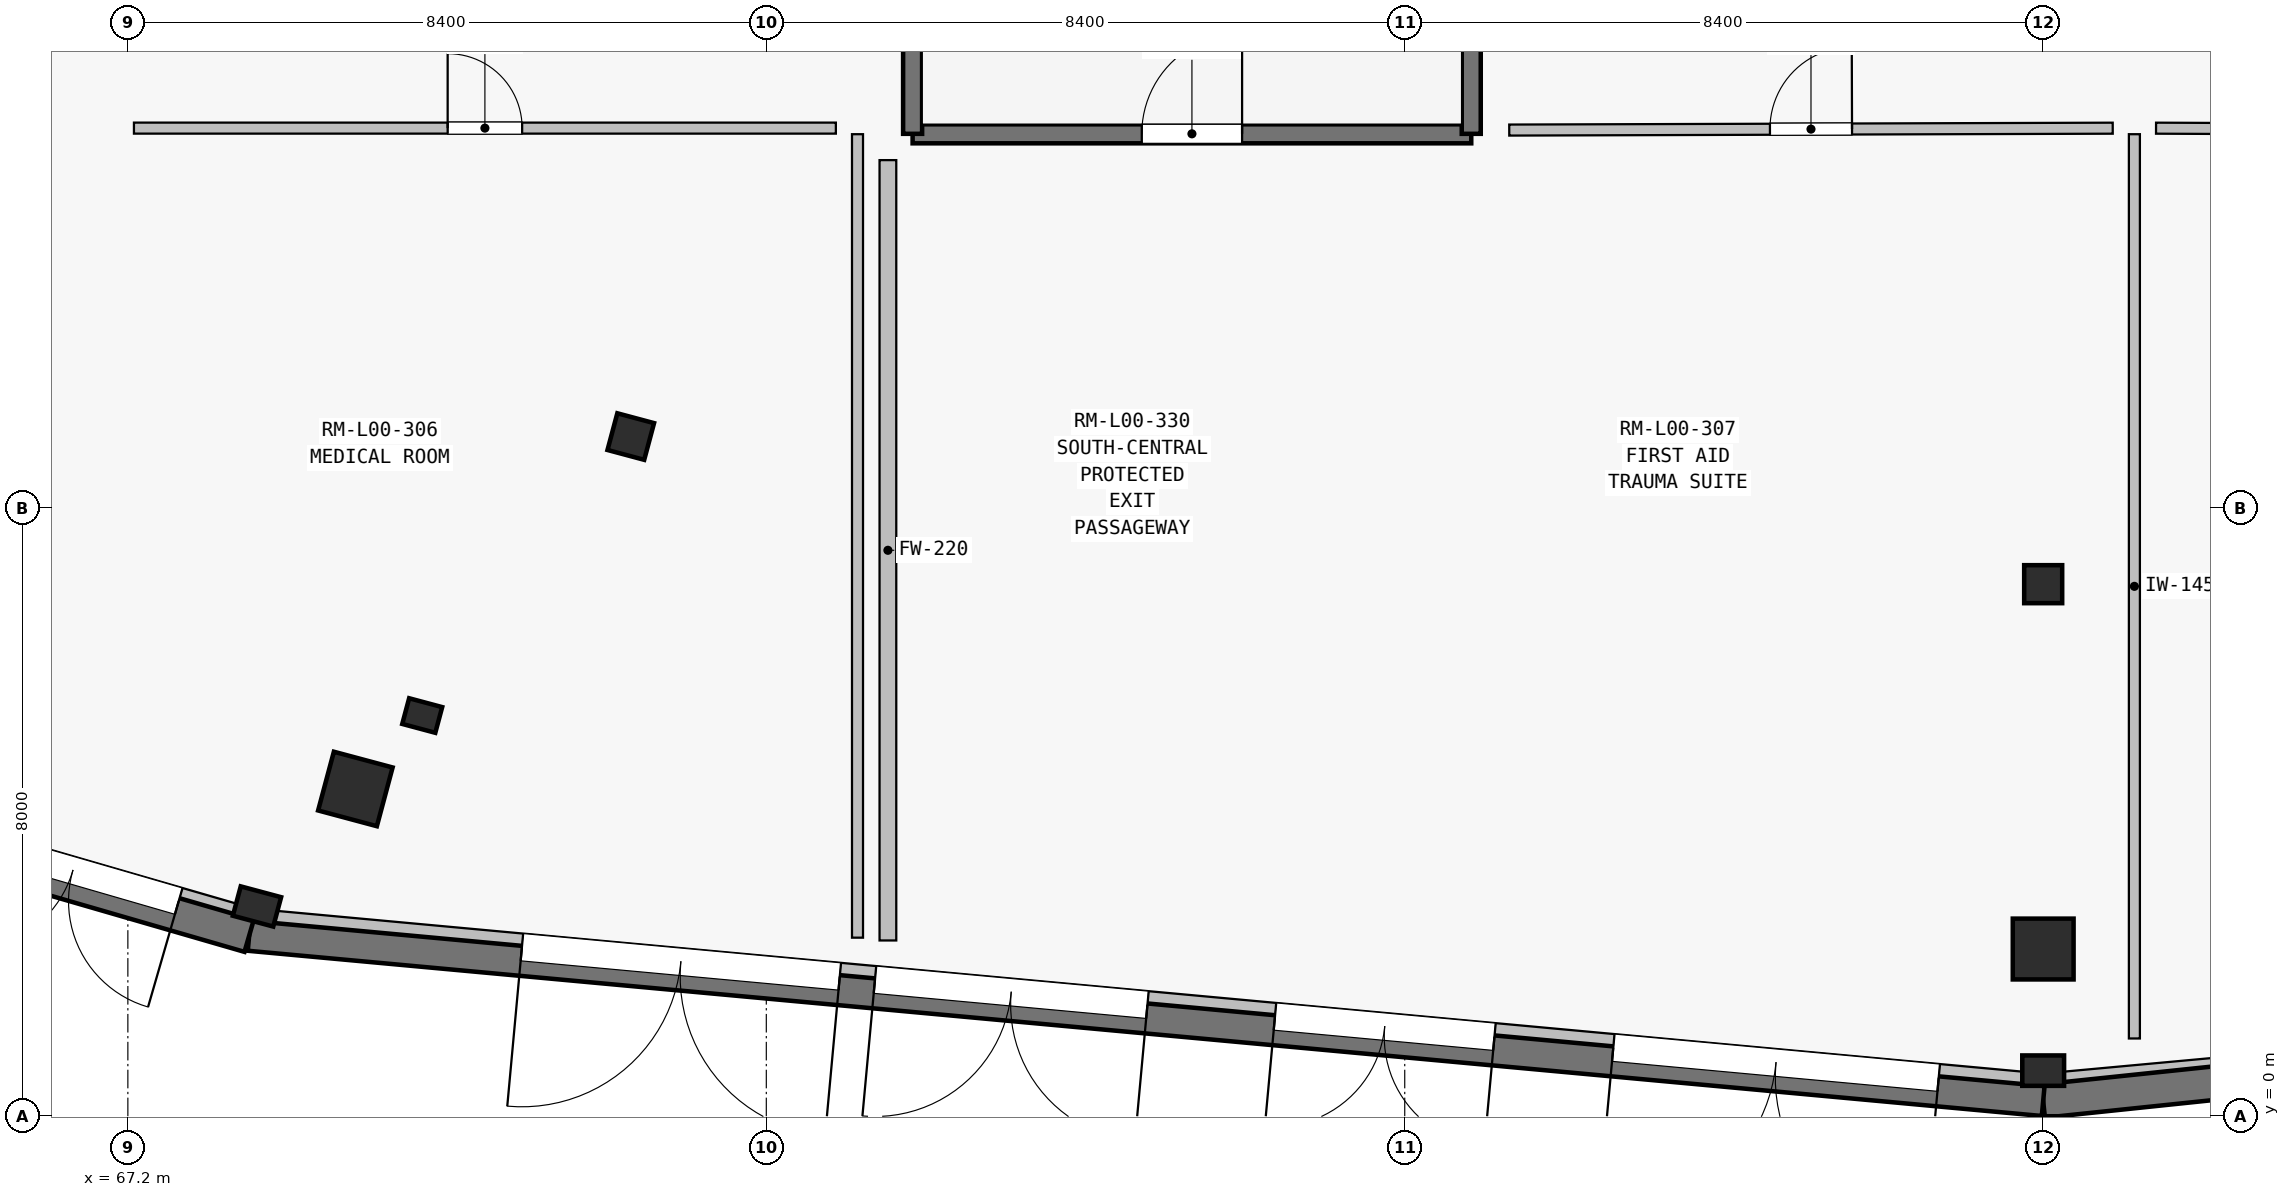
"""IFC4 building model, lengths in metres.
Left out: names, types, materials, properties, quantities, classifications, styles, units other than length and angle.
Written with IfcOpenShell. Run it as: python <this file> out.ifc"""

import sys

from ifc_helpers import new_model, si_unit, direction, frame, frame_2d, origin, origin_2d, place, context, subcontext, project, spatial, rectangle, i_section, extrude, element, fill, save


model = new_model("IFC4")
c1 = context("Model", 3, precision=1e-05, world=origin(), true_north=direction((0.0, 1.0)))
c2 = subcontext(c1, "Body", "Model", "MODEL_VIEW")
j1 = project(units=[si_unit("LENGTHUNIT", "METRE"), si_unit("PLANEANGLEUNIT", "RADIAN")], contexts=[c1])
p1 = place(None, origin())
s1 = spatial("IfcSite", under=j1, at=p1, CompositionType="ELEMENT")
p2 = place(p1, origin())
s2 = spatial("IfcBuilding", under=s1, at=p2, CompositionType="ELEMENT")
p3 = place(p2, origin())
s3 = spatial("IfcBuildingStorey", under=s2, at=p3, CompositionType="ELEMENT", Elevation=0.0)
for number, where, z_axis, x_axis in (
    (1, (73.817, 8.942, 0.0), (0.0, 0.0, 1.0), (-0.259, -0.966, 0.0)),
    (2, (92.4, 7.0, 0.0), (0.0, 0.0, 1.0), (0.0, -1.0, 0.0)),
):
    element("IfcColumn", number, at=place(p3, frame(where, z_axis=z_axis, x_axis=x_axis)), inside=s3, PredefinedType="COLUMN", context=c2, shape_type="SweptSolid", body=[
        extrude(i_section(OverallWidth=0.5, OverallDepth=0.5, WebThickness=0.02, FlangeThickness=0.035, at=origin_2d()), origin(), (0.0, 0.0, 1.0), 5.4),
    ])
for number, where, z_axis, x_axis in (
    (3, (70.193, 4.306, 0.0), (0.0, 0.0, 1.0), (-0.259, -0.966, 0.0)),
    (4, (92.4, 2.2, 0.0), (0.0, 0.0, 1.0), (0.0, -1.0, 0.0)),
):
    element("IfcColumn", number, at=place(p3, frame(where, z_axis=z_axis, x_axis=x_axis)), inside=s3, PredefinedType="COLUMN", context=c2, shape_type="SweptSolid", body=[
        extrude(rectangle(XDim=0.8, YDim=0.8, at=origin_2d()), origin(), (0.0, 0.0, 1.0), 5.4),
    ])
for number, where, z_axis, x_axis in (
    (5, (68.899, 2.76, 0.0), (0.0, 0.0, 1.0), (-0.259, -0.966, 0.0)),
    (6, (92.4, 0.6, 0.0), (0.0, 0.0, 1.0), (0.0, -1.0, 0.0)),
):
    element("IfcColumn", number, at=place(p3, frame(where, z_axis=z_axis, x_axis=x_axis)), inside=s3, PredefinedType="PILASTER", context=c2, shape_type="SweptSolid", body=[
        extrude(rectangle(XDim=0.4, YDim=0.55, at=origin_2d()), origin(), (0.0, 0.0, 1.0), 6.35),
    ])
p4 = place(p3, frame((71.073, 5.272, 0.0), z_axis=(0.0, 0.0, 1.0), x_axis=(-0.258819045103, -0.965925826289, 0.0)))
e7 = element("IfcColumn", 7, at=p4, inside=s3, PredefinedType="PILASTER", context=c2, shape_type="SweptSolid", body=[
    extrude(rectangle(XDim=0.35, YDim=0.45, at=origin_2d()), origin(), (0.0, 0.0, 1.0), 5.4),
])
p5 = place(p3, frame((116.031, 2.557, 0.0), z_axis=(0.0, 0.0, 1.0), x_axis=(-0.995785515714, -0.09171263105, 0.0)))
e8 = element("IfcWall", 8, at=p5, inside=s3, PredefinedType="SOLIDWALL", context=c2, shape_type="SweptSolid", body=[
    extrude(rectangle(XDim=23.791, YDim=0.36, at=frame_2d((11.895, 0.0))), origin(), (0.0, 0.0, 1.0), 5.15),
])
p6 = place(p5, frame((8.31, 0.0, 0.0)))
e9 = element("IfcOpeningElement", 9, at=p6, cuts=e8, PredefinedType="OPENING", context=c2, shape_type="SweptSolid", body=[
    extrude(rectangle(XDim=2.9, YDim=2.55, at=frame_2d((1.45, 1.275))), frame((0.0, 0.19, 0.0), z_axis=(0.0, -1.0, 0.0), x_axis=(1.0, 0.0, 0.0)), (0.0, 0.0, 1.0), 0.38),
])
p7 = place(p5, frame((11.895, 0.0, 0.0)))
e10 = element("IfcOpeningElement", 10, at=p7, cuts=e8, PredefinedType="OPENING", context=c2, shape_type="SweptSolid", body=[
    extrude(rectangle(XDim=3.6, YDim=2.6, at=frame_2d((1.8, 1.3))), frame((0.0, 0.19, 0.0), z_axis=(0.0, -1.0, 0.0), x_axis=(1.0, 0.0, 0.0)), (0.0, 0.0, 1.0), 0.38),
])
p8 = place(p5, frame((2.54, 0.0, 0.0)))
e11 = element("IfcOpeningElement", 11, at=p8, cuts=e8, PredefinedType="OPENING", context=c2, shape_type="SweptSolid", body=[
    extrude(rectangle(XDim=4.3, YDim=2.75, at=frame_2d((2.15, 1.375))), frame((0.0, 0.19, 0.0), z_axis=(0.0, -1.0, 0.0), x_axis=(1.0, 0.0, 0.0)), (0.0, 0.0, 1.0), 0.38),
])
p9 = place(p5, frame((15.96, 0.0, 0.0)))
e12 = element("IfcOpeningElement", 12, at=p9, cuts=e8, PredefinedType="OPENING", context=c2, shape_type="SweptSolid", body=[
    extrude(rectangle(XDim=4.2, YDim=2.7, at=frame_2d((2.1, 1.35))), frame((0.0, 0.19, 0.0), z_axis=(0.0, -1.0, 0.0), x_axis=(1.0, 0.0, 0.0)), (0.0, 0.0, 1.0), 0.38),
])
p10 = place(p3, frame((92.459, 0.375, 0.0), z_axis=(0.0, 0.0, 1.0), x_axis=(-0.995785515714, 0.09171263105, 0.0)))
e13 = element("IfcWall", 13, at=p10, inside=s3, PredefinedType="SOLIDWALL", context=c2, shape_type="SweptSolid", body=[
    extrude(rectangle(XDim=23.791, YDim=0.36, at=frame_2d((11.895, 0.0))), origin(), (0.0, 0.0, 1.0), 5.15),
])
p11 = place(p10, frame((7.31, 0.0, 0.0)))
e14 = element("IfcOpeningElement", 14, at=p11, cuts=e13, PredefinedType="OPENING", context=c2, shape_type="SweptSolid", body=[
    extrude(rectangle(XDim=2.9, YDim=2.55, at=frame_2d((1.45, 1.275))), frame((0.0, 0.19, 0.0), z_axis=(0.0, -1.0, 0.0), x_axis=(1.0, 0.0, 0.0)), (0.0, 0.0, 1.0), 0.38),
])
p12 = place(p10, frame((11.895, 0.0, 0.0)))
e15 = element("IfcOpeningElement", 15, at=p12, cuts=e13, PredefinedType="OPENING", context=c2, shape_type="SweptSolid", body=[
    extrude(rectangle(XDim=3.6, YDim=2.6, at=frame_2d((1.8, 1.3))), frame((0.0, 0.19, 0.0), z_axis=(0.0, -1.0, 0.0), x_axis=(1.0, 0.0, 0.0)), (0.0, 0.0, 1.0), 0.38),
])
p13 = place(p10, frame((1.44, 0.0, 0.0)))
e16 = element("IfcOpeningElement", 16, at=p13, cuts=e13, PredefinedType="OPENING", context=c2, shape_type="SweptSolid", body=[
    extrude(rectangle(XDim=4.3, YDim=2.75, at=frame_2d((2.15, 1.375))), frame((0.0, 0.19, 0.0), z_axis=(0.0, -1.0, 0.0), x_axis=(1.0, 0.0, 0.0)), (0.0, 0.0, 1.0), 0.38),
])
p14 = place(p10, frame((15.96, 0.0, 0.0)))
e17 = element("IfcOpeningElement", 17, at=p14, cuts=e13, PredefinedType="OPENING", context=c2, shape_type="SweptSolid", body=[
    extrude(rectangle(XDim=4.2, YDim=2.7, at=frame_2d((2.1, 1.35))), frame((0.0, 0.19, 0.0), z_axis=(0.0, -1.0, 0.0), x_axis=(1.0, 0.0, 0.0)), (0.0, 0.0, 1.0), 0.38),
])
p15 = place(p3, frame((68.887, 2.535, 0.0), z_axis=(0.0, 0.0, 1.0), x_axis=(-0.960488382724, 0.278320079498, 0.0)))
e18 = element("IfcWall", 18, at=p15, inside=s3, PredefinedType="SOLIDWALL", context=c2, shape_type="SweptSolid", body=[
    extrude(rectangle(XDim=22.987, YDim=0.36, at=frame_2d((11.493, 0.0))), origin(), (0.0, 0.0, 1.0), 5.15),
])
p16 = place(p15, frame((1.06, 0.0, 0.0)))
e19 = element("IfcOpeningElement", 19, at=p16, cuts=e18, PredefinedType="OPENING", context=c2, shape_type="SweptSolid", body=[
    extrude(rectangle(XDim=2.9, YDim=2.55, at=frame_2d((1.45, 1.275))), frame((0.0, 0.19, 0.0), z_axis=(0.0, -1.0, 0.0), x_axis=(1.0, 0.0, 0.0)), (0.0, 0.0, 1.0), 0.38),
])
p17 = place(p15, frame((9.693, 0.0, 0.0)))
e20 = element("IfcOpeningElement", 20, at=p17, cuts=e18, PredefinedType="OPENING", context=c2, shape_type="SweptSolid", body=[
    extrude(rectangle(XDim=3.6, YDim=2.6, at=frame_2d((1.8, 1.3))), frame((0.0, 0.19, 0.0), z_axis=(0.0, -1.0, 0.0), x_axis=(1.0, 0.0, 0.0)), (0.0, 0.0, 1.0), 0.38),
])
p18 = place(p15, frame((4.3, 0.0, 0.0)))
e21 = element("IfcOpeningElement", 21, at=p18, cuts=e18, PredefinedType="OPENING", context=c2, shape_type="SweptSolid", body=[
    extrude(rectangle(XDim=4.3, YDim=2.75, at=frame_2d((2.15, 1.375))), frame((0.0, 0.19, 0.0), z_axis=(0.0, -1.0, 0.0), x_axis=(1.0, 0.0, 0.0)), (0.0, 0.0, 1.0), 0.38),
])
p19 = place(p15, frame((13.76, 0.0, 0.0)))
e22 = element("IfcOpeningElement", 22, at=p19, cuts=e18, PredefinedType="OPENING", context=c2, shape_type="SweptSolid", body=[
    extrude(rectangle(XDim=4.2, YDim=2.7, at=frame_2d((2.1, 1.35))), frame((0.0, 0.19, 0.0), z_axis=(0.0, -1.0, 0.0), x_axis=(1.0, 0.0, 0.0)), (0.0, 0.0, 1.0), 0.38),
])
p20 = place(p15, frame((18.38, 0.0, 0.0)))
e23 = element("IfcOpeningElement", 23, at=p20, cuts=e18, PredefinedType="OPENING", context=c2, shape_type="SweptSolid", body=[
    extrude(rectangle(XDim=2.9, YDim=2.55, at=frame_2d((1.45, 1.275))), frame((0.0, 0.19, 0.0), z_axis=(0.0, -1.0, 0.0), x_axis=(1.0, 0.0, 0.0)), (0.0, 0.0, 1.0), 0.38),
])
p21 = place(p3, frame((117.6, 2.836, -4.5), z_axis=(0.0, 0.0, 1.0), x_axis=(-0.994572720995, -0.104043753549, 0.0)))
e24 = element("IfcWall", 24, at=p21, inside=s3, PredefinedType="USERDEFINED", context=c2, shape_type="SweptSolid", body=[
    extrude(rectangle(XDim=25.338, YDim=0.44, at=frame_2d((12.669, 0.0))), origin(), (0.0, 0.0, 1.0), 4.5),
])
p22 = place(p3, frame((92.4, 0.2, -4.5), z_axis=(0.0, 0.0, 1.0), x_axis=(-0.995786061743, 0.091706702251, 0.0)))
e25 = element("IfcWall", 25, at=p22, inside=s3, PredefinedType="USERDEFINED", context=c2, shape_type="SweptSolid", body=[
    extrude(rectangle(XDim=23.704, YDim=0.395, at=frame_2d((11.852, 0.0))), origin(), (0.0, 0.0, 1.0), 4.5),
])
p23 = place(p3, frame((68.796, 2.374, -4.5), z_axis=(0.0, 0.0, 1.0), x_axis=(-0.960486896269, 0.278325209236, 0.0)))
e26 = element("IfcWall", 26, at=p23, inside=s3, PredefinedType="USERDEFINED", context=c2, shape_type="SweptSolid", body=[
    extrude(rectangle(XDim=22.9, YDim=0.44, at=frame_2d((11.45, 0.0))), origin(), (0.0, 0.0, 1.0), 4.5),
])
p24 = place(p3, frame((77.525, 12.925, 0.0), z_axis=(0.0, 0.0, 1.0), x_axis=(1.0, 0.0, 0.0)))
e27 = element("IfcWall", 27, at=p24, inside=s3, PredefinedType="SHEAR", context=c2, shape_type="SweptSolid", body=[
    extrude(rectangle(XDim=7.35, YDim=0.25, at=frame_2d((3.675, 0.0))), origin(), (0.0, 0.0, 1.0), 5.4),
])
p25 = place(p24, frame((3.015, 0.0, 0.0)))
e28 = element("IfcOpeningElement", 28, at=p25, cuts=e27, PredefinedType="OPENING", context=c2, shape_type="SweptSolid", body=[
    extrude(rectangle(XDim=1.32, YDim=2.2, at=frame_2d((0.66, 1.1))), frame((0.0, 0.135, 0.0), z_axis=(0.0, -1.0, 0.0), x_axis=(1.0, 0.0, 0.0)), (0.0, 0.0, 1.0), 0.27),
])
for number, where, z_axis, x_axis in (
    (29, (77.525, 12.925, 0.0), (0.0, 0.0, 1.0), (0.0, 1.0, 0.0)),
    (30, (84.875, 12.925, 0.0), (0.0, 0.0, 1.0), (0.0, 1.0, 0.0)),
):
    element("IfcWall", number, at=place(p3, frame(where, z_axis=z_axis, x_axis=x_axis)), inside=s3, PredefinedType="SHEAR", context=c2, shape_type="SweptSolid", body=[
        extrude(rectangle(XDim=12.75, YDim=0.25, at=frame_2d((6.375, 0.0))), origin(), (0.0, 0.0, 1.0), 5.4),
    ])
p26 = place(p3, frame((76.8, 12.92, 0.0), z_axis=(0.0, 0.0, 1.0), x_axis=(0.0, -1.0, 0.0)))
e31 = element("IfcWall", 31, at=p26, inside=s3, PredefinedType="PARTITIONING", context=c2, shape_type="SweptSolid", body=[
    extrude(rectangle(XDim=10.571, YDim=0.145, at=frame_2d((5.285, 0.0))), origin(), (0.0, 0.0, 1.0), 4.295),
])
p27 = place(p3, frame((67.28, 13.0, 0.0), z_axis=(0.0, 0.0, 1.0), x_axis=(1.0, 0.0, 0.0)))
e32 = element("IfcWall", 32, at=p27, inside=s3, PredefinedType="PARTITIONING", context=c2, shape_type="SweptSolid", body=[
    extrude(rectangle(XDim=9.235, YDim=0.145, at=frame_2d((4.618, 0.0))), origin(), (0.0, 0.0, 1.0), 4.503),
])
p28 = place(p27, frame((4.128, 0.0, 0.0)))
e33 = element("IfcOpeningElement", 33, at=p28, cuts=e32, PredefinedType="OPENING", context=c2, shape_type="SweptSolid", body=[
    extrude(rectangle(XDim=0.98, YDim=2.15, at=frame_2d((0.49, 1.075))), frame((0.0, 0.083, 0.0), z_axis=(0.0, -1.0, 0.0), x_axis=(1.0, 0.0, 0.0)), (0.0, 0.0, 1.0), 0.165),
])
p29 = place(p3, frame((93.6, 12.92, 0.0), z_axis=(0.0, 0.0, 1.0), x_axis=(0.0, -1.0, 0.0)))
e34 = element("IfcWall", 34, at=p29, inside=s3, PredefinedType="PARTITIONING", context=c2, shape_type="SweptSolid", body=[
    extrude(rectangle(XDim=11.897, YDim=0.145, at=frame_2d((5.948, 0.0))), origin(), (0.0, 0.0, 1.0), 4.295),
])
p30 = place(p3, frame((85.375, 12.974, 0.0), z_axis=(0.0, 0.0, 1.0), x_axis=(0.99999517769, 0.003105575086, 0.0)))
e35 = element("IfcWall", 35, at=p30, inside=s3, PredefinedType="PARTITIONING", context=c2, shape_type="SweptSolid", body=[
    extrude(rectangle(XDim=7.94, YDim=0.145, at=frame_2d((3.97, 0.0))), origin(), (0.0, 0.0, 1.0), 4.483),
])
p31 = place(p30, frame((3.43, 0.0, 0.0)))
e36 = element("IfcOpeningElement", 36, at=p31, cuts=e35, PredefinedType="OPENING", context=c2, shape_type="SweptSolid", body=[
    extrude(rectangle(XDim=1.08, YDim=2.15, at=frame_2d((0.54, 1.075))), frame((0.0, 0.083, 0.0), z_axis=(0.0, -1.0, 0.0), x_axis=(1.0, 0.0, 0.0)), (0.0, 0.0, 1.0), 0.165),
])
p32 = place(p3, frame((93.885, 12.999, 0.0), z_axis=(0.0, 0.0, 1.0), x_axis=(0.99999048325, -0.004362729501, 0.0)))
e37 = element("IfcWall", 37, at=p32, inside=s3, PredefinedType="PARTITIONING", context=c2, shape_type="SweptSolid", body=[
    extrude(rectangle(XDim=5.54, YDim=0.145, at=frame_2d((2.77, 0.0))), origin(), (0.0, 0.0, 1.0), 5.12),
])
p33 = place(p32, frame((2.28, 0.0, 0.0)))
e38 = element("IfcOpeningElement", 38, at=p33, cuts=e37, PredefinedType="OPENING", context=c2, shape_type="SweptSolid", body=[
    extrude(rectangle(XDim=0.98, YDim=2.15, at=frame_2d((0.49, 1.075))), frame((0.0, 0.083, 0.0), z_axis=(0.0, -1.0, 0.0), x_axis=(1.0, 0.0, 0.0)), (0.0, 0.0, 1.0), 0.165),
])
p34 = place(p3, frame((77.2, 2.312, 0.0), z_axis=(0.0, 0.0, 1.0), x_axis=(0.0, 1.0, 0.0)))
e39 = element("IfcWall", 39, at=p34, inside=s3, PredefinedType="SOLIDWALL", context=c2, shape_type="SweptSolid", body=[
    extrude(rectangle(XDim=10.267, YDim=0.22, at=frame_2d((5.133, 0.0))), origin(), (0.0, 0.0, 1.0), 4.295),
])
p35 = place(p16, origin())
e40 = element("IfcDoor", 40, at=p35, inside=s3, OperationType="DOUBLE_DOOR_SINGLE_SWING", PredefinedType="DOOR", context=c2, shape_type="SweptSolid", body=[
    extrude(rectangle(XDim=2.9, YDim=2.55, at=frame_2d((1.45, 1.275))), frame((0.0, 0.025, 0.0), z_axis=(0.0, -1.0, 0.0), x_axis=(1.0, 0.0, 0.0)), (0.0, 0.0, 1.0), 0.05),
])
fill(e19, e40)
p36 = place(p11, origin())
e41 = element("IfcDoor", 41, at=p36, inside=s3, OperationType="DOUBLE_DOOR_SINGLE_SWING", PredefinedType="DOOR", context=c2, shape_type="SweptSolid", body=[
    extrude(rectangle(XDim=2.9, YDim=2.55, at=frame_2d((1.45, 1.275))), frame((0.0, 0.025, 0.0), z_axis=(0.0, -1.0, 0.0), x_axis=(1.0, 0.0, 0.0)), (0.0, 0.0, 1.0), 0.05),
])
fill(e14, e41)
p37 = place(p12, origin())
e42 = element("IfcDoor", 42, at=p37, inside=s3, OperationType="DOUBLE_DOOR_SINGLE_SWING", PredefinedType="DOOR", context=c2, shape_type="SweptSolid", body=[
    extrude(rectangle(XDim=3.6, YDim=2.6, at=frame_2d((1.8, 1.3))), frame((0.0, 0.025, 0.0), z_axis=(0.0, -1.0, 0.0), x_axis=(1.0, 0.0, 0.0)), (0.0, 0.0, 1.0), 0.05),
])
fill(e15, e42)
p38 = place(p13, origin())
e43 = element("IfcDoor", 43, at=p38, inside=s3, OperationType="DOUBLE_DOOR_SINGLE_SWING", PredefinedType="DOOR", context=c2, shape_type="SweptSolid", body=[
    extrude(rectangle(XDim=4.3, YDim=2.75, at=frame_2d((2.15, 1.375))), frame((0.0, 0.025, 0.0), z_axis=(0.0, -1.0, 0.0), x_axis=(1.0, 0.0, 0.0)), (0.0, 0.0, 1.0), 0.05),
])
fill(e16, e43)
p39 = place(p14, origin())
e44 = element("IfcDoor", 44, at=p39, inside=s3, OperationType="DOUBLE_DOOR_SINGLE_SWING", PredefinedType="DOOR", context=c2, shape_type="SweptSolid", body=[
    extrude(rectangle(XDim=4.2, YDim=2.7, at=frame_2d((2.1, 1.35))), frame((0.0, 0.025, 0.0), z_axis=(0.0, -1.0, 0.0), x_axis=(1.0, 0.0, 0.0)), (0.0, 0.0, 1.0), 0.05),
])
fill(e17, e44)
p40 = place(p25, origin())
e45 = element("IfcDoor", 45, at=p40, inside=s3, OperationType="SINGLE_SWING_RIGHT", PredefinedType="DOOR", context=c2, shape_type="SweptSolid", body=[
    extrude(rectangle(XDim=1.32, YDim=2.2, at=frame_2d((0.66, 1.1))), frame((0.0, 0.025, 0.0), z_axis=(0.0, -1.0, 0.0), x_axis=(1.0, 0.0, 0.0)), (0.0, 0.0, 1.0), 0.05),
])
fill(e28, e45)
p41 = place(p28, origin())
e46 = element("IfcDoor", 46, at=p41, inside=s3, OperationType="SINGLE_SWING_LEFT", PredefinedType="DOOR", context=c2, shape_type="SweptSolid", body=[
    extrude(rectangle(XDim=0.98, YDim=2.15, at=frame_2d((0.49, 1.075))), frame((0.0, 0.025, 0.0), z_axis=(0.0, -1.0, 0.0), x_axis=(1.0, 0.0, 0.0)), (0.0, 0.0, 1.0), 0.05),
])
fill(e33, e46)
p42 = place(p31, origin())
e47 = element("IfcDoor", 47, at=p42, inside=s3, OperationType="SINGLE_SWING_RIGHT", PredefinedType="DOOR", context=c2, shape_type="SweptSolid", body=[
    extrude(rectangle(XDim=1.08, YDim=2.15, at=frame_2d((0.54, 1.075))), frame((0.0, 0.025, 0.0), z_axis=(0.0, -1.0, 0.0), x_axis=(1.0, 0.0, 0.0)), (0.0, 0.0, 1.0), 0.05),
])
fill(e36, e47)
save(model, sys.argv[1])
